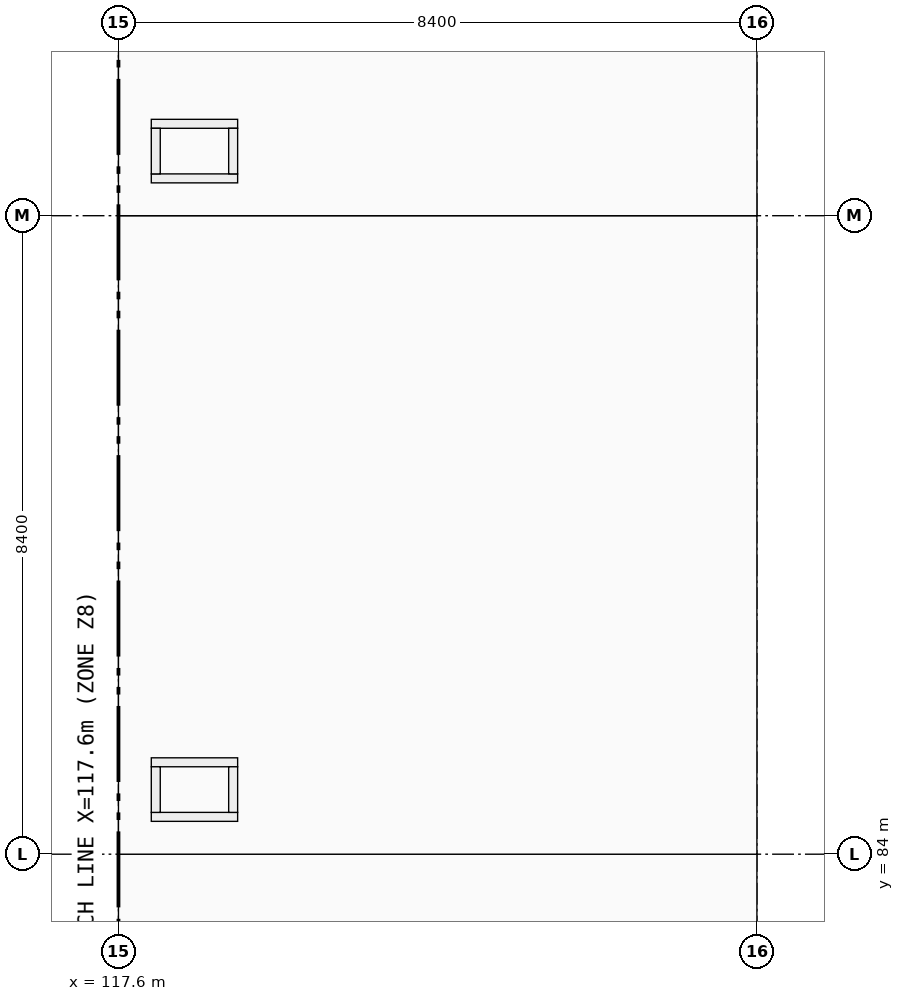
"""IFC4 building model, lengths in metres.
Left out: names, types, materials, properties, quantities, classifications, styles, units other than length and angle.
Written with IfcOpenShell. Run it as: python <this file> out.ifc"""

import sys

from ifc_helpers import new_model, si_unit, direction, frame, frame_2d, origin, origin_2d, place, context, subcontext, project, spatial, rectangle, extrude, element, save


model = new_model("IFC4")
c1 = context("Model", 3, precision=1e-05, world=origin(), true_north=direction((0.0, 1.0)))
c2 = subcontext(c1, "Body", "Model", "MODEL_VIEW")
j1 = project(units=[si_unit("LENGTHUNIT", "METRE"), si_unit("PLANEANGLEUNIT", "RADIAN")], contexts=[c1])
p1 = place(None, origin())
s1 = spatial("IfcSite", under=j1, at=p1, CompositionType="ELEMENT")
p2 = place(p1, origin())
s2 = spatial("IfcBuilding", under=s1, at=p2, CompositionType="ELEMENT")
p3 = place(p2, frame((0.0, 0.0, 5.76)))
s3 = spatial("IfcBuildingStorey", under=s2, at=p3, CompositionType="ELEMENT", Elevation=5.76)
p4 = place(p3, frame((117.6, 84.0, 0.0), z_axis=(0.0, 0.0, 1.0), x_axis=(1.0, 0.0, 0.0)))
e1 = element("IfcColumn", 1, at=p4, inside=s3, PredefinedType="COLUMN", context=c2, shape_type="SweptSolid", body=[
    extrude(rectangle(XDim=0.65, YDim=0.65, at=origin_2d()), origin(), (0.0, 0.0, 1.0), 4.5),
])
for number, where, z_axis, x_axis in (
    (2, (117.6, 92.4, 0.0), (0.0, 0.0, 1.0), (1.0, 0.0, 0.0)),
    (3, (126.0, 84.0, 0.0), (0.0, 0.0, 1.0), (1.0, 0.0, 0.0)),
):
    element("IfcColumn", number, at=place(p3, frame(where, z_axis=z_axis, x_axis=x_axis)), inside=s3, PredefinedType="COLUMN", context=c2, shape_type="SweptSolid", body=[
        extrude(rectangle(XDim=0.6, YDim=0.6, at=origin_2d()), origin(), (0.0, 0.0, 1.0), 4.5),
    ])
p5 = place(p3, frame((126.0, 92.4, 0.0), z_axis=(0.0, 0.0, 1.0), x_axis=(1.0, 0.0, 0.0)))
e4 = element("IfcColumn", 4, at=p5, inside=s3, PredefinedType="COLUMN", context=c2, shape_type="SweptSolid", body=[
    extrude(rectangle(XDim=0.65, YDim=0.65, at=origin_2d()), origin(), (0.0, 0.0, 1.0), 4.5),
])
for number, where, z_axis, x_axis in (
    (5, (118.032, 84.491, 0.0), (0.0, 0.0, 1.0), (1.0, 0.0, 0.0)),
    (6, (118.032, 85.209, 0.0), (0.0, 0.0, 1.0), (1.0, 0.0, 0.0)),
):
    element("IfcWall", number, at=place(p3, frame(where, z_axis=z_axis, x_axis=x_axis)), inside=s3, PredefinedType="PARTITIONING", context=c2, shape_type="SweptSolid", body=[
        extrude(rectangle(XDim=1.136, YDim=0.118, at=frame_2d((0.568, 0.0))), origin(), (0.0, 0.0, 1.0), 3.48),
    ])
for number, where, z_axis, x_axis in (
    (7, (118.091, 84.55, 0.0), (0.0, 0.0, 1.0), (0.0, 1.0, 0.0)),
    (8, (119.109, 84.55, 0.0), (0.0, 0.0, 1.0), (0.0, 1.0, 0.0)),
):
    element("IfcWall", number, at=place(p3, frame(where, z_axis=z_axis, x_axis=x_axis)), inside=s3, PredefinedType="PARTITIONING", context=c2, shape_type="SweptSolid", body=[
        extrude(rectangle(XDim=0.6, YDim=0.118, at=frame_2d((0.3, 0.0))), origin(), (0.0, 0.0, 1.0), 3.48),
    ])
for number, where, z_axis, x_axis in (
    (9, (118.032, 92.891, 0.0), (0.0, 0.0, 1.0), (1.0, 0.0, 0.0)),
    (10, (118.032, 93.609, 0.0), (0.0, 0.0, 1.0), (1.0, 0.0, 0.0)),
):
    element("IfcWall", number, at=place(p3, frame(where, z_axis=z_axis, x_axis=x_axis)), inside=s3, PredefinedType="PARTITIONING", context=c2, shape_type="SweptSolid", body=[
        extrude(rectangle(XDim=1.136, YDim=0.118, at=frame_2d((0.568, 0.0))), origin(), (0.0, 0.0, 1.0), 3.48),
    ])
for number, where, z_axis, x_axis in (
    (11, (118.091, 92.95, 0.0), (0.0, 0.0, 1.0), (0.0, 1.0, 0.0)),
    (12, (119.109, 92.95, 0.0), (0.0, 0.0, 1.0), (0.0, 1.0, 0.0)),
):
    element("IfcWall", number, at=place(p3, frame(where, z_axis=z_axis, x_axis=x_axis)), inside=s3, PredefinedType="PARTITIONING", context=c2, shape_type="SweptSolid", body=[
        extrude(rectangle(XDim=0.6, YDim=0.118, at=frame_2d((0.3, 0.0))), origin(), (0.0, 0.0, 1.0), 3.48),
    ])
save(model, sys.argv[1])
